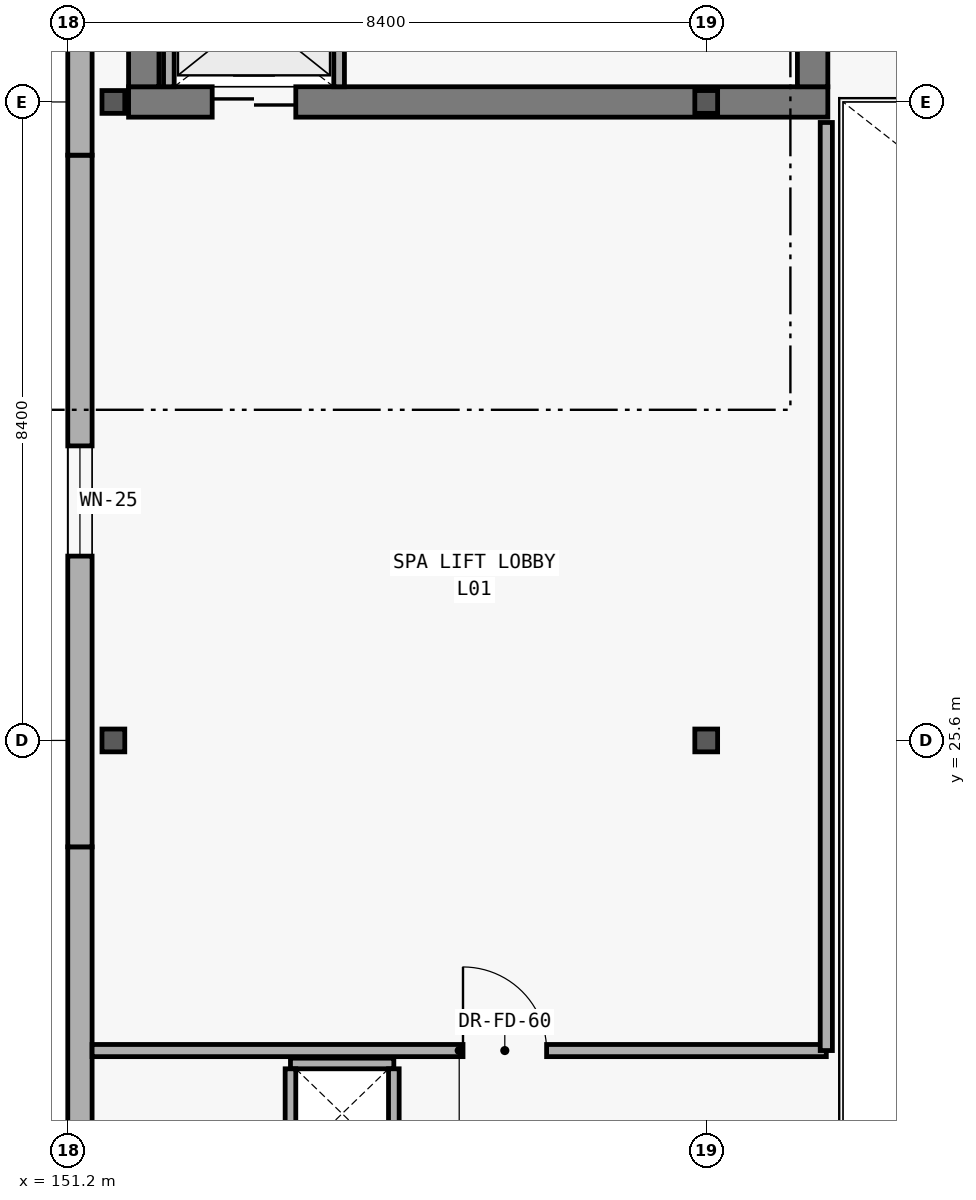
"""IFC4 building model, lengths in metres.
Left out: names, types, materials, properties, quantities, classifications, styles, units other than length and angle.
Written with IfcOpenShell. Run it as: python <this file> out.ifc"""

import sys

from ifc_helpers import new_model, si_unit, direction, frame, frame_2d, origin, origin_2d, place, context, subcontext, project, spatial, rectangle, i_section, extrude, element, fill, save


model = new_model("IFC4")
c1 = context("Model", 3, precision=1e-05, world=origin(), true_north=direction((0.0, 1.0)))
c2 = subcontext(c1, "Body", "Model", "MODEL_VIEW")
j1 = project(units=[si_unit("LENGTHUNIT", "METRE"), si_unit("PLANEANGLEUNIT", "RADIAN")], contexts=[c1])
p1 = place(None, origin())
s1 = spatial("IfcSite", under=j1, at=p1, CompositionType="ELEMENT")
p2 = place(p1, origin())
s2 = spatial("IfcBuilding", under=s1, at=p2, CompositionType="ELEMENT")
p3 = place(p2, frame((0.0, 0.0, 5.4)))
s3 = spatial("IfcBuildingStorey", under=s2, at=p3, CompositionType="ELEMENT", Elevation=5.4)
for number, where, z_axis, x_axis in (
    (1, (151.8, 25.6, 0.0), (0.0, 0.0, 1.0), (1.0, 0.0, 0.0)),
    (2, (151.8, 34.0, 0.0), (0.0, 0.0, 1.0), (1.0, 0.0, 0.0)),
    (3, (159.6, 25.6, 0.0), (0.0, 0.0, 1.0), (1.0, 0.0, 0.0)),
    (4, (159.6, 34.0, 0.0), (0.0, 0.0, 1.0), (1.0, 0.0, 0.0)),
):
    element("IfcColumn", number, at=place(p3, frame(where, z_axis=z_axis, x_axis=x_axis)), inside=s3, PredefinedType="COLUMN", context=c2, shape_type="SweptSolid", body=[
        extrude(i_section(OverallWidth=0.3, OverallDepth=0.3, WebThickness=0.011, FlangeThickness=0.019, at=origin_2d()), origin(), (0.0, 0.0, 1.0), 5.4),
    ])
p4 = place(p3, frame((151.36, 15.1, 0.0), z_axis=(0.0, 0.0, 1.0), x_axis=(0.0, 1.0, 0.0)))
e5 = element("IfcWall", 5, at=p4, inside=s3, PredefinedType="SOLIDWALL", context=c2, shape_type="SweptSolid", body=[
    extrude(rectangle(XDim=9.1, YDim=0.32, at=frame_2d((4.55, 0.0))), origin(), (0.0, 0.0, 1.0), 5.1),
])
p5 = place(p4, frame((3.925, 0.0, 0.9)))
e6 = element("IfcOpeningElement", 6, at=p5, cuts=e5, PredefinedType="OPENING", context=c2, shape_type="SweptSolid", body=[
    extrude(rectangle(XDim=1.25, YDim=1.45, at=frame_2d((0.625, 0.725))), frame((0.0, 0.17, 0.0), z_axis=(0.0, -1.0, 0.0), x_axis=(1.0, 0.0, 0.0)), (0.0, 0.0, 1.0), 0.34),
])
p6 = place(p3, frame((151.36, 24.2, 0.0), z_axis=(0.0, 0.0, 1.0), x_axis=(0.0, 1.0, 0.0)))
e7 = element("IfcWall", 7, at=p6, inside=s3, PredefinedType="SOLIDWALL", context=c2, shape_type="SweptSolid", body=[
    extrude(rectangle(XDim=9.1, YDim=0.32, at=frame_2d((4.55, 0.0))), origin(), (0.0, 0.0, 1.0), 5.1),
])
p7 = place(p6, frame((3.825, 0.0, 0.9)))
e8 = element("IfcOpeningElement", 8, at=p7, cuts=e7, PredefinedType="OPENING", context=c2, shape_type="SweptSolid", body=[
    extrude(rectangle(XDim=1.45, YDim=1.65, at=frame_2d((0.725, 0.825))), frame((0.0, 0.17, 0.0), z_axis=(0.0, -1.0, 0.0), x_axis=(1.0, 0.0, 0.0)), (0.0, 0.0, 1.0), 0.34),
])
p8 = place(p3, frame((151.36, 33.3, 0.0), z_axis=(0.0, 0.0, 1.0), x_axis=(0.0, 1.0, 0.0)))
e9 = element("IfcWall", 9, at=p8, inside=s3, PredefinedType="SOLIDWALL", context=c2, shape_type="SweptSolid", body=[
    extrude(rectangle(XDim=9.1, YDim=0.32, at=frame_2d((4.55, 0.0))), origin(), (0.0, 0.0, 1.0), 5.1),
])
p9 = place(p8, frame((3.7, 0.0, 0.9)))
e10 = element("IfcOpeningElement", 10, at=p9, cuts=e9, PredefinedType="OPENING", context=c2, shape_type="SweptSolid", body=[
    extrude(rectangle(XDim=1.7, YDim=2.0, at=frame_2d((0.85, 1.0))), frame((0.0, 0.17, 0.0), z_axis=(0.0, -1.0, 0.0), x_axis=(1.0, 0.0, 0.0)), (0.0, 0.0, 1.0), 0.34),
])
p10 = place(p3, frame((152.0, 34.0, 0.0), z_axis=(0.0, 0.0, 1.0), x_axis=(1.0, 0.0, 0.0)))
e11 = element("IfcWall", 11, at=p10, inside=s3, PredefinedType="SHEAR", context=c2, shape_type="SweptSolid", body=[
    extrude(rectangle(XDim=9.2, YDim=0.4, at=frame_2d((4.6, 0.0))), origin(), (0.0, 0.0, 1.0), 5.08),
])
p11 = place(p10, frame((1.1, 0.0, 0.0)))
e12 = element("IfcOpeningElement", 12, at=p11, cuts=e11, PredefinedType="OPENING", context=c2, shape_type="SweptSolid", body=[
    extrude(rectangle(XDim=1.1, YDim=2.2, at=frame_2d((0.55, 1.1))), frame((0.0, 0.21, 0.0), z_axis=(0.0, -1.0, 0.0), x_axis=(1.0, 0.0, 0.0)), (0.0, 0.0, 1.0), 0.42),
])
p12 = place(p3, frame((152.2, 41.6, 0.0), z_axis=(0.0, 0.0, 1.0), x_axis=(0.0, -1.0, 0.0)))
e13 = element("IfcWall", 13, at=p12, inside=s3, PredefinedType="SHEAR", context=c2, shape_type="SweptSolid", body=[
    extrude(rectangle(XDim=7.4, YDim=0.4, at=frame_2d((3.7, 0.0))), origin(), (0.0, 0.0, 1.0), 5.08),
])
p13 = place(p3, frame((161.0, 34.2, 0.0), z_axis=(0.0, 0.0, 1.0), x_axis=(0.0, 1.0, 0.0)))
e14 = element("IfcWall", 14, at=p13, inside=s3, PredefinedType="SHEAR", context=c2, shape_type="SweptSolid", body=[
    extrude(rectangle(XDim=7.4, YDim=0.4, at=frame_2d((3.7, 0.0))), origin(), (0.0, 0.0, 1.0), 5.08),
])
p14 = place(p13, frame((5.9, 0.0, 0.0)))
e15 = element("IfcOpeningElement", 15, at=p14, cuts=e14, PredefinedType="OPENING", context=c2, shape_type="SweptSolid", body=[
    extrude(rectangle(XDim=1.15, YDim=2.2, at=frame_2d((0.575, 1.1))), frame((0.0, 0.21, 0.0), z_axis=(0.0, -1.0, 0.0), x_axis=(1.0, 0.0, 0.0)), (0.0, 0.0, 1.0), 0.42),
])
for number, where, z_axis, x_axis in (
    (16, (152.53, 34.2, 0.0), (0.0, 0.0, 1.0), (0.0, 1.0, 0.0)),
    (17, (154.77, 34.2, 0.0), (0.0, 0.0, 1.0), (0.0, 1.0, 0.0)),
):
    element("IfcWall", number, at=place(p3, frame(where, z_axis=z_axis, x_axis=x_axis)), inside=s3, PredefinedType="PARTITIONING", context=c2, shape_type="SweptSolid", body=[
        extrude(rectangle(XDim=1.6, YDim=0.14, at=frame_2d((0.8, 0.0))), origin(), (0.0, 0.0, 1.0), 4.23),
    ])
p15 = place(p3, frame((151.52, 21.52, 0.0), z_axis=(0.0, 0.0, 1.0), x_axis=(1.0, 0.0, 0.0)))
e18 = element("IfcWall", 18, at=p15, inside=s3, PredefinedType="PARTITIONING", context=c2, shape_type="SweptSolid", body=[
    extrude(rectangle(XDim=9.66, YDim=0.16, at=frame_2d((4.83, 0.0))), origin(), (0.0, 0.0, 1.0), 4.18),
])
p16 = place(p15, frame((4.88, 0.0, 0.0)))
e19 = element("IfcOpeningElement", 19, at=p16, cuts=e18, PredefinedType="OPENING", context=c2, shape_type="SweptSolid", body=[
    extrude(rectangle(XDim=1.1, YDim=2.2, at=frame_2d((0.55, 1.1))), frame((0.0, 0.09, 0.0), z_axis=(0.0, -1.0, 0.0), x_axis=(1.0, 0.0, 0.0)), (0.0, 0.0, 1.0), 0.18),
])
p17 = place(p3, frame((161.18, 21.52, 0.0), z_axis=(0.0, 0.0, 1.0), x_axis=(0.0, 1.0, 0.0)))
e20 = element("IfcWall", 20, at=p17, inside=s3, PredefinedType="PARTITIONING", context=c2, shape_type="SweptSolid", body=[
    extrude(rectangle(XDim=12.21, YDim=0.16, at=frame_2d((6.105, 0.0))), origin(), (0.0, 0.0, 1.0), 4.18),
])
p18 = place(p3, frame((155.49, 21.35, 0.0), z_axis=(0.0, 0.0, 1.0), x_axis=(-1.0, 0.0, 0.0)))
e21 = element("IfcWall", 21, at=p18, inside=s3, PredefinedType="PARTITIONING", context=c2, shape_type="SweptSolid", body=[
    extrude(rectangle(XDim=1.36, YDim=0.14, at=frame_2d((0.68, 0.0))), origin(), (0.0, 0.0, 1.0), 4.2),
])
for number, where, z_axis, x_axis in (
    (22, (154.13, 21.28, 0.0), (0.0, 0.0, 1.0), (0.0, -1.0, 0.0)),
    (23, (155.49, 20.1, 0.0), (0.0, 0.0, 1.0), (0.0, 1.0, 0.0)),
):
    element("IfcWall", number, at=place(p3, frame(where, z_axis=z_axis, x_axis=x_axis)), inside=s3, PredefinedType="PARTITIONING", context=c2, shape_type="SweptSolid", body=[
        extrude(rectangle(XDim=1.18, YDim=0.14, at=frame_2d((0.59, 0.0))), origin(), (0.0, 0.0, 1.0), 4.2),
    ])
p19 = place(p7, origin())
e24 = element("IfcWindow", 24, at=p19, inside=s3, PartitioningType="SINGLE_PANEL", PredefinedType="WINDOW", context=c2, shape_type="SweptSolid", body=[
    extrude(rectangle(XDim=1.45, YDim=1.65, at=frame_2d((0.725, 0.825))), frame((0.0, 0.03, 0.0), z_axis=(0.0, -1.0, 0.0), x_axis=(1.0, 0.0, 0.0)), (0.0, 0.0, 1.0), 0.06),
])
fill(e8, e24)
p20 = place(p11, origin())
e25 = element("IfcDoor", 25, at=p20, inside=s3, OperationType="DOUBLE_DOOR_SLIDING", PredefinedType="DOOR", context=c2, shape_type="SweptSolid", body=[
    extrude(rectangle(XDim=1.1, YDim=2.2, at=frame_2d((0.55, 1.1))), frame((0.0, 0.025, 0.0), z_axis=(0.0, -1.0, 0.0), x_axis=(1.0, 0.0, 0.0)), (0.0, 0.0, 1.0), 0.05),
])
fill(e12, e25)
p21 = place(p16, origin())
e26 = element("IfcDoor", 26, at=p21, inside=s3, OperationType="SINGLE_SWING_LEFT", PredefinedType="DOOR", context=c2, shape_type="SweptSolid", body=[
    extrude(rectangle(XDim=1.1, YDim=2.2, at=frame_2d((0.55, 1.1))), frame((0.0, 0.025, 0.0), z_axis=(0.0, -1.0, 0.0), x_axis=(1.0, 0.0, 0.0)), (0.0, 0.0, 1.0), 0.05),
])
fill(e19, e26)
save(model, sys.argv[1])
